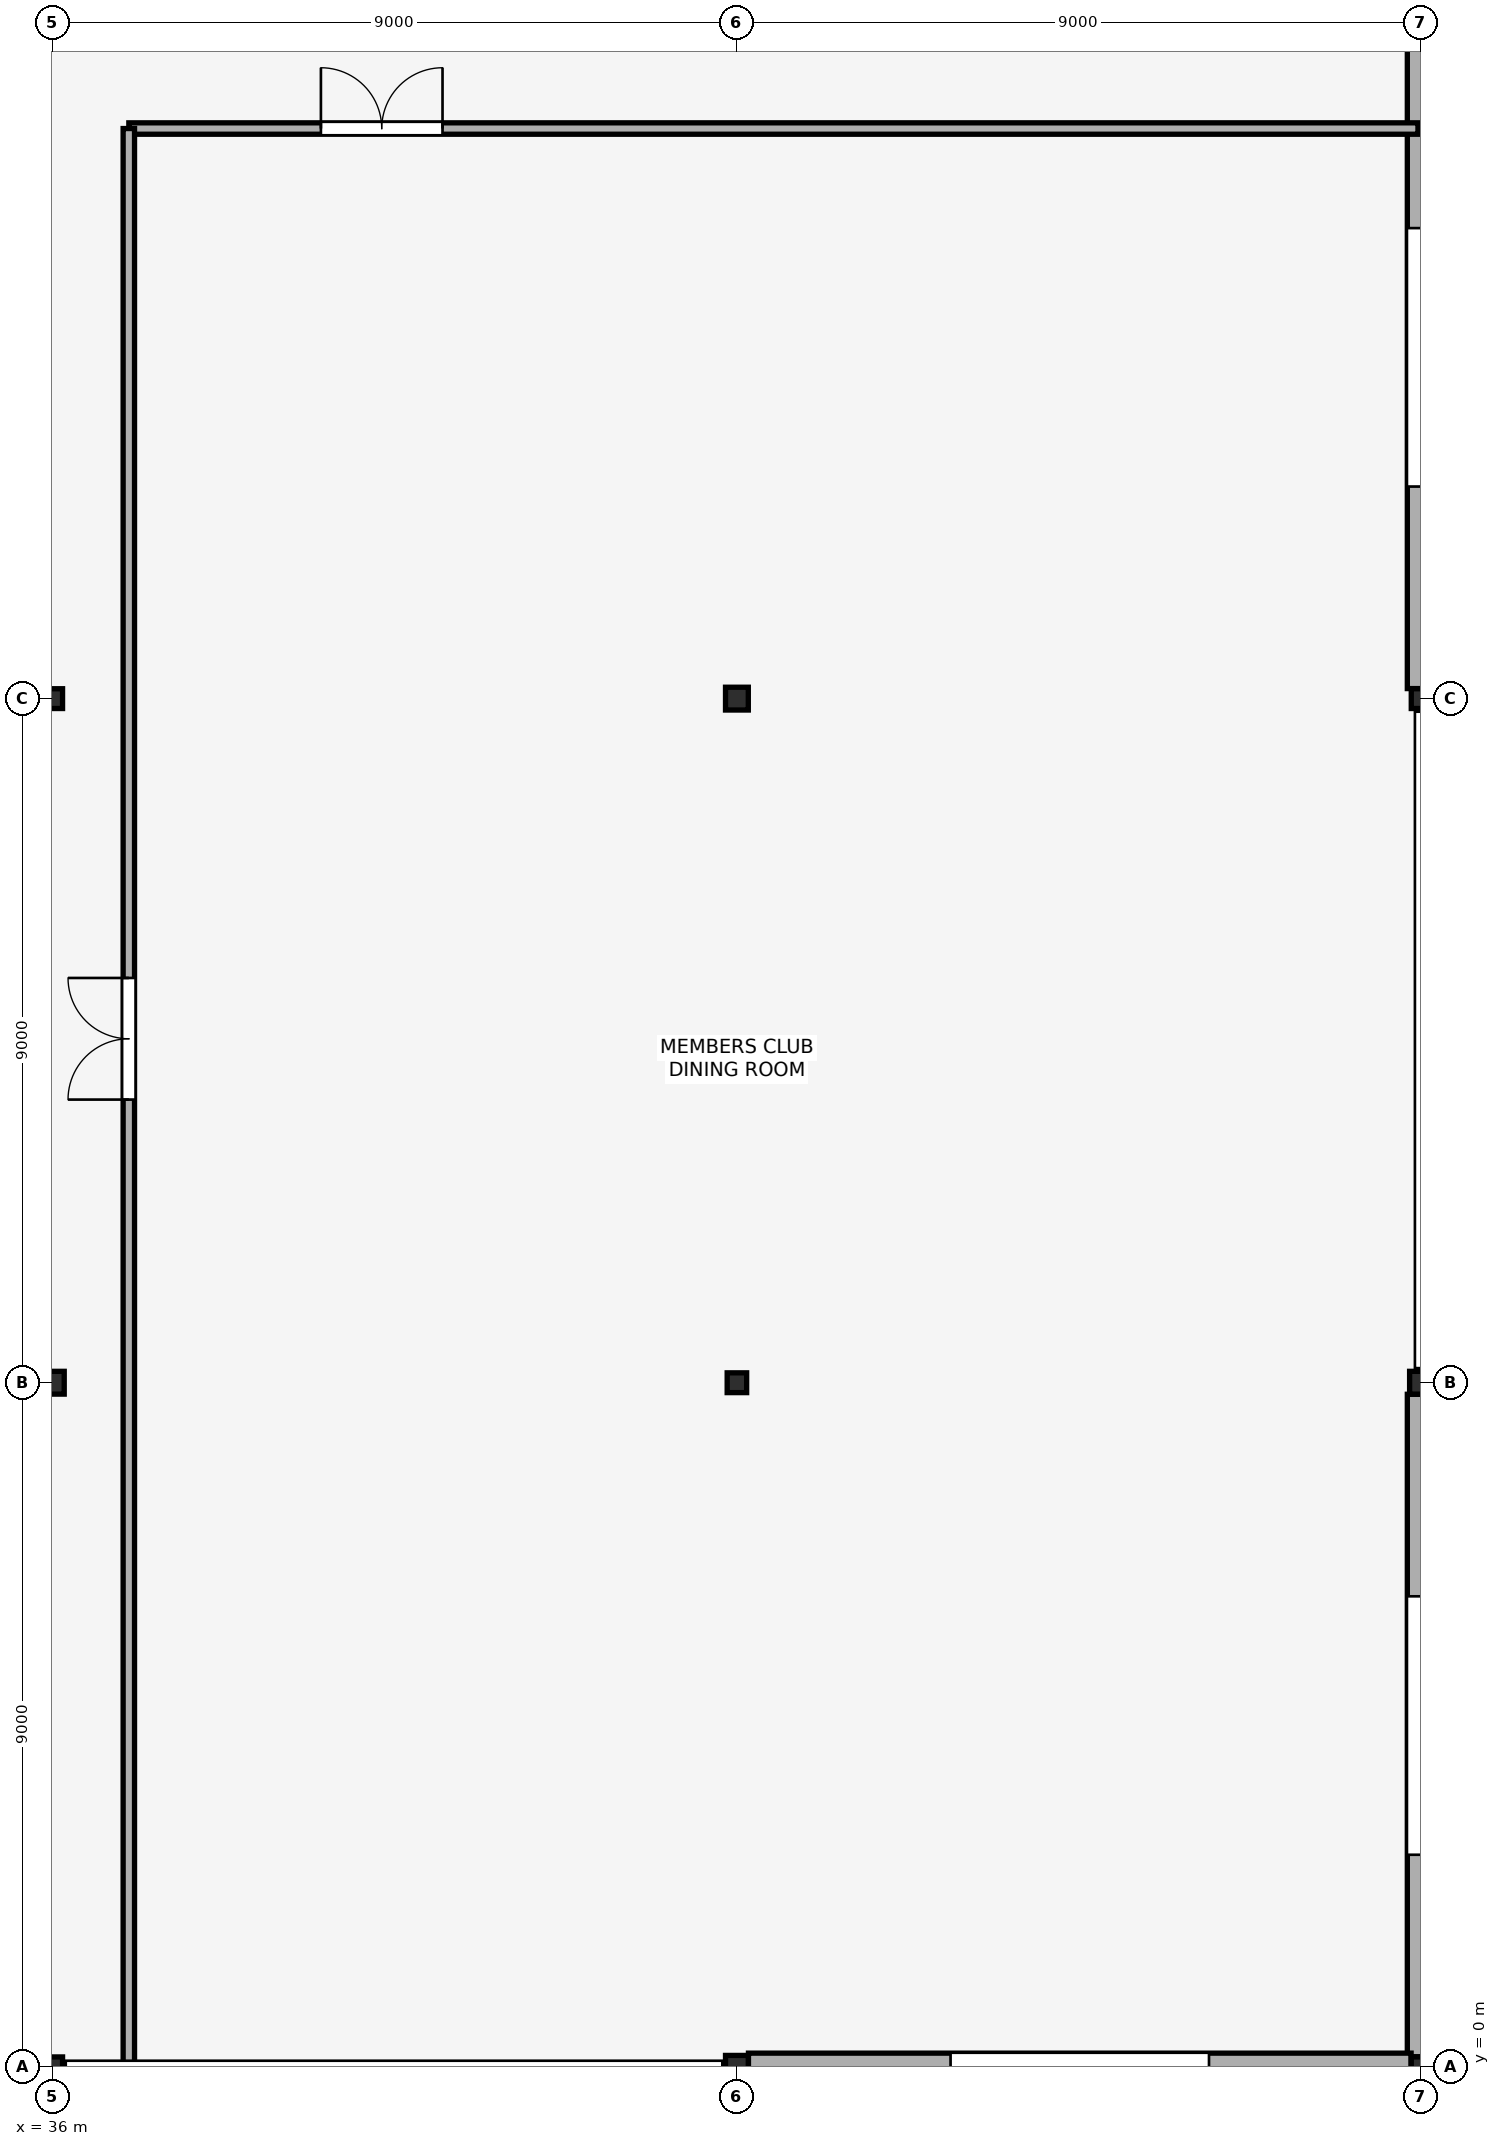
"""IFC4 building model, lengths in metres.
Left out: names, types, materials, properties, quantities, classifications, styles, units other than length and angle.
Written with IfcOpenShell. Run it as: python <this file> out.ifc"""

import sys

from ifc_helpers import new_model, si_unit, direction, frame, frame_2d, origin, origin_2d, place, context, subcontext, project, spatial, rectangle, hollow_rectangle, i_section, extrude, element, fill, save


model = new_model("IFC4")
c1 = context("Model", 3, precision=1e-05, world=origin(), true_north=direction((0.0, 1.0)))
c2 = subcontext(c1, "Body", "Model", "MODEL_VIEW")
j1 = project(units=[si_unit("LENGTHUNIT", "METRE"), si_unit("PLANEANGLEUNIT", "RADIAN")], contexts=[c1])
p1 = place(None, origin())
s1 = spatial("IfcSite", under=j1, at=p1, CompositionType="ELEMENT")
p2 = place(p1, origin())
s2 = spatial("IfcBuilding", under=s1, at=p2, CompositionType="ELEMENT")
p3 = place(p2, frame((0.0, 0.0, 10.2)))
s3 = spatial("IfcBuildingStorey", under=s2, at=p3, CompositionType="ELEMENT", Elevation=10.2)
p4 = place(p3, frame((36.0, 0.0, 0.0), z_axis=(0.0, 0.0, 1.0), x_axis=(1.0, 0.0, 0.0)))
e1 = element("IfcColumn", 1, at=p4, inside=s3, PredefinedType="COLUMN", context=c2, shape_type="SweptSolid", body=[
    extrude(i_section(OverallWidth=0.256, OverallDepth=0.26, WebThickness=0.01, FlangeThickness=0.017, FilletRadius=0.013, at=origin_2d()), origin(), (0.0, 0.0, 1.0), 4.8),
])
p5 = place(p3, frame((36.0, 9.0, 0.0), z_axis=(0.0, 0.0, 1.0), x_axis=(1.0, 0.0, 0.0)))
e2 = element("IfcColumn", 2, at=p5, inside=s3, PredefinedType="COLUMN", context=c2, shape_type="SweptSolid", body=[
    extrude(hollow_rectangle(XDim=0.3, YDim=0.3, WallThickness=0.012, at=origin_2d()), origin(), (0.0, 0.0, 1.0), 4.8),
])
p6 = place(p3, frame((36.0, 18.0, 0.0), z_axis=(0.0, 0.0, 1.0), x_axis=(1.0, 0.0, 0.0)))
e3 = element("IfcColumn", 3, at=p6, inside=s3, PredefinedType="COLUMN", context=c2, shape_type="SweptSolid", body=[
    extrude(i_section(OverallWidth=0.256, OverallDepth=0.26, WebThickness=0.01, FlangeThickness=0.017, FilletRadius=0.013, at=origin_2d()), origin(), (0.0, 0.0, 1.0), 4.8),
])
p7 = place(p3, frame((45.0, 0.0, 0.0), z_axis=(0.0, 0.0, 1.0), x_axis=(1.0, 0.0, 0.0)))
e4 = element("IfcColumn", 4, at=p7, inside=s3, PredefinedType="COLUMN", context=c2, shape_type="SweptSolid", body=[
    extrude(hollow_rectangle(XDim=0.3, YDim=0.3, WallThickness=0.012, at=origin_2d()), origin(), (0.0, 0.0, 1.0), 4.8),
])
p8 = place(p3, frame((45.0, 9.0, 0.0), z_axis=(0.0, 0.0, 1.0), x_axis=(1.0, 0.0, 0.0)))
e5 = element("IfcColumn", 5, at=p8, inside=s3, PredefinedType="COLUMN", context=c2, shape_type="SweptSolid", body=[
    extrude(i_section(OverallWidth=0.256, OverallDepth=0.26, WebThickness=0.01, FlangeThickness=0.017, FilletRadius=0.013, at=origin_2d()), origin(), (0.0, 0.0, 1.0), 4.8),
])
p9 = place(p3, frame((45.0, 18.0, 0.0), z_axis=(0.0, 0.0, 1.0), x_axis=(1.0, 0.0, 0.0)))
e6 = element("IfcColumn", 6, at=p9, inside=s3, PredefinedType="COLUMN", context=c2, shape_type="SweptSolid", body=[
    extrude(hollow_rectangle(XDim=0.3, YDim=0.3, WallThickness=0.012, at=origin_2d()), origin(), (0.0, 0.0, 1.0), 4.8),
])
p10 = place(p3, frame((54.0, 0.0, 0.0), z_axis=(0.0, 0.0, 1.0), x_axis=(1.0, 0.0, 0.0)))
e7 = element("IfcColumn", 7, at=p10, inside=s3, PredefinedType="COLUMN", context=c2, shape_type="SweptSolid", body=[
    extrude(i_section(OverallWidth=0.256, OverallDepth=0.26, WebThickness=0.01, FlangeThickness=0.017, FilletRadius=0.013, at=origin_2d()), origin(), (0.0, 0.0, 1.0), 4.8),
])
p11 = place(p3, frame((54.0, 9.0, 0.0), z_axis=(0.0, 0.0, 1.0), x_axis=(1.0, 0.0, 0.0)))
e8 = element("IfcColumn", 8, at=p11, inside=s3, PredefinedType="COLUMN", context=c2, shape_type="SweptSolid", body=[
    extrude(hollow_rectangle(XDim=0.3, YDim=0.3, WallThickness=0.012, at=origin_2d()), origin(), (0.0, 0.0, 1.0), 4.8),
])
p12 = place(p3, frame((54.0, 18.0, 0.0), z_axis=(0.0, 0.0, 1.0), x_axis=(1.0, 0.0, 0.0)))
e9 = element("IfcColumn", 9, at=p12, inside=s3, PredefinedType="COLUMN", context=c2, shape_type="SweptSolid", body=[
    extrude(i_section(OverallWidth=0.256, OverallDepth=0.26, WebThickness=0.01, FlangeThickness=0.017, FilletRadius=0.013, at=origin_2d()), origin(), (0.0, 0.0, 1.0), 4.8),
])
p13 = place(p3, frame((54.0, 26.848, 0.0), z_axis=(0.0, 0.0, 1.0), x_axis=(0.0, -1.0, 0.0)))
e10 = element("IfcWall", 10, at=p13, inside=s3, PredefinedType="STANDARD", context=c2, shape_type="SweptSolid", body=[
    extrude(rectangle(XDim=8.716, YDim=0.36, at=frame_2d((4.358, 0.0))), origin(), (0.0, 0.0, 1.0), 4.215),
])
p14 = place(p13, frame((2.658, 0.0, 0.9)))
e11 = element("IfcOpeningElement", 11, at=p14, cuts=e10, PredefinedType="OPENING", context=c2, shape_type="SweptSolid", body=[
    extrude(rectangle(XDim=3.4, YDim=2.0, at=frame_2d((1.7, 1.0))), frame((0.0, 0.19, 0.0), z_axis=(0.0, -1.0, 0.0), x_axis=(1.0, 0.0, 0.0)), (0.0, 0.0, 1.0), 0.38),
])
p15 = place(p3, frame((54.0, 8.848, 0.0), z_axis=(0.0, 0.0, 1.0), x_axis=(0.0, -1.0, 0.0)))
e12 = element("IfcWall", 12, at=p15, inside=s3, PredefinedType="STANDARD", context=c2, shape_type="SweptSolid", body=[
    extrude(rectangle(XDim=8.716, YDim=0.36, at=frame_2d((4.358, 0.0))), origin(), (0.0, 0.0, 1.0), 4.215),
])
p16 = place(p15, frame((2.658, 0.0, 0.9)))
e13 = element("IfcOpeningElement", 13, at=p16, cuts=e12, PredefinedType="OPENING", context=c2, shape_type="SweptSolid", body=[
    extrude(rectangle(XDim=3.4, YDim=2.0, at=frame_2d((1.7, 1.0))), frame((0.0, 0.19, 0.0), z_axis=(0.0, -1.0, 0.0), x_axis=(1.0, 0.0, 0.0)), (0.0, 0.0, 1.0), 0.38),
])
p17 = place(p3, frame((53.87, 0.0, 0.0), z_axis=(0.0, 0.0, 1.0), x_axis=(-1.0, 0.0, 0.0)))
e14 = element("IfcWall", 14, at=p17, inside=s3, PredefinedType="STANDARD", context=c2, shape_type="SweptSolid", body=[
    extrude(rectangle(XDim=8.718, YDim=0.36, at=frame_2d((4.359, 0.0))), origin(), (0.0, 0.0, 1.0), 3.907),
])
p18 = place(p17, frame((2.659, 0.0, 0.9)))
e15 = element("IfcOpeningElement", 15, at=p18, cuts=e14, PredefinedType="OPENING", context=c2, shape_type="SweptSolid", body=[
    extrude(rectangle(XDim=3.4, YDim=2.0, at=frame_2d((1.7, 1.0))), frame((0.0, 0.19, 0.0), z_axis=(0.0, -1.0, 0.0), x_axis=(1.0, 0.0, 0.0)), (0.0, 0.0, 1.0), 0.38),
])
p19 = place(p3, frame((37.0, 25.5, 0.0), z_axis=(0.0, 0.0, 1.0), x_axis=(1.0, 0.0, 0.0)))
e16 = element("IfcWall", 16, at=p19, inside=s3, PredefinedType="PARTITIONING", context=c2, shape_type="SweptSolid", body=[
    extrude(rectangle(XDim=16.96, YDim=0.15, at=frame_2d((8.48, 0.0))), origin(), (0.0, 0.0, 1.0), 4.52),
])
p20 = place(p19, frame((2.527, 0.0, 0.0)))
e17 = element("IfcOpeningElement", 17, at=p20, cuts=e16, PredefinedType="OPENING", context=c2, shape_type="SweptSolid", body=[
    extrude(rectangle(XDim=1.6, YDim=2.2, at=frame_2d((0.8, 1.1))), frame((0.0, 0.085, 0.0), z_axis=(0.0, -1.0, 0.0), x_axis=(1.0, 0.0, 0.0)), (0.0, 0.0, 1.0), 0.17),
])
p21 = place(p3, frame((37.0, 0.02, 0.0), z_axis=(0.0, 0.0, 1.0), x_axis=(0.0, 1.0, 0.0)))
e18 = element("IfcWall", 18, at=p21, inside=s3, PredefinedType="PARTITIONING", context=c2, shape_type="SweptSolid", body=[
    extrude(rectangle(XDim=25.48, YDim=0.15, at=frame_2d((12.74, 0.0))), origin(), (0.0, 0.0, 1.0), 4.52),
])
p22 = place(p21, frame((12.705, 0.0, 0.0)))
e19 = element("IfcOpeningElement", 19, at=p22, cuts=e18, PredefinedType="OPENING", context=c2, shape_type="SweptSolid", body=[
    extrude(rectangle(XDim=1.6, YDim=2.2, at=frame_2d((0.8, 1.1))), frame((0.0, 0.085, 0.0), z_axis=(0.0, -1.0, 0.0), x_axis=(1.0, 0.0, 0.0)), (0.0, 0.0, 1.0), 0.17),
])
p23 = place(p14, origin())
e20 = element("IfcWindow", 20, at=p23, inside=s3, PartitioningType="SINGLE_PANEL", PredefinedType="WINDOW", context=c2, shape_type="SweptSolid", body=[
    extrude(rectangle(XDim=3.4, YDim=2.0, at=frame_2d((1.7, 1.0))), frame((0.0, 0.03, 0.0), z_axis=(0.0, -1.0, 0.0), x_axis=(1.0, 0.0, 0.0)), (0.0, 0.0, 1.0), 0.06),
])
fill(e11, e20)
p24 = place(p16, origin())
e21 = element("IfcWindow", 21, at=p24, inside=s3, PartitioningType="SINGLE_PANEL", PredefinedType="WINDOW", context=c2, shape_type="SweptSolid", body=[
    extrude(rectangle(XDim=3.4, YDim=2.0, at=frame_2d((1.7, 1.0))), frame((0.0, 0.03, 0.0), z_axis=(0.0, -1.0, 0.0), x_axis=(1.0, 0.0, 0.0)), (0.0, 0.0, 1.0), 0.06),
])
fill(e13, e21)
p25 = place(p18, origin())
e22 = element("IfcWindow", 22, at=p25, inside=s3, PartitioningType="SINGLE_PANEL", PredefinedType="WINDOW", context=c2, shape_type="SweptSolid", body=[
    extrude(rectangle(XDim=3.4, YDim=2.0, at=frame_2d((1.7, 1.0))), frame((0.0, 0.03, 0.0), z_axis=(0.0, -1.0, 0.0), x_axis=(1.0, 0.0, 0.0)), (0.0, 0.0, 1.0), 0.06),
])
fill(e15, e22)
p26 = place(p22, origin())
e23 = element("IfcDoor", 23, at=p26, inside=s3, OperationType="DOUBLE_DOOR_SINGLE_SWING", PredefinedType="DOOR", context=c2, shape_type="SweptSolid", body=[
    extrude(rectangle(XDim=1.6, YDim=2.2, at=frame_2d((0.8, 1.1))), frame((0.0, 0.025, 0.0), z_axis=(0.0, -1.0, 0.0), x_axis=(1.0, 0.0, 0.0)), (0.0, 0.0, 1.0), 0.05),
])
fill(e19, e23)
p27 = place(p20, origin())
e24 = element("IfcDoor", 24, at=p27, inside=s3, OperationType="DOUBLE_DOOR_SINGLE_SWING", PredefinedType="DOOR", context=c2, shape_type="SweptSolid", body=[
    extrude(rectangle(XDim=1.6, YDim=2.2, at=frame_2d((0.8, 1.1))), frame((0.0, 0.025, 0.0), z_axis=(0.0, -1.0, 0.0), x_axis=(1.0, 0.0, 0.0)), (0.0, 0.0, 1.0), 0.05),
])
fill(e17, e24)
save(model, sys.argv[1])
